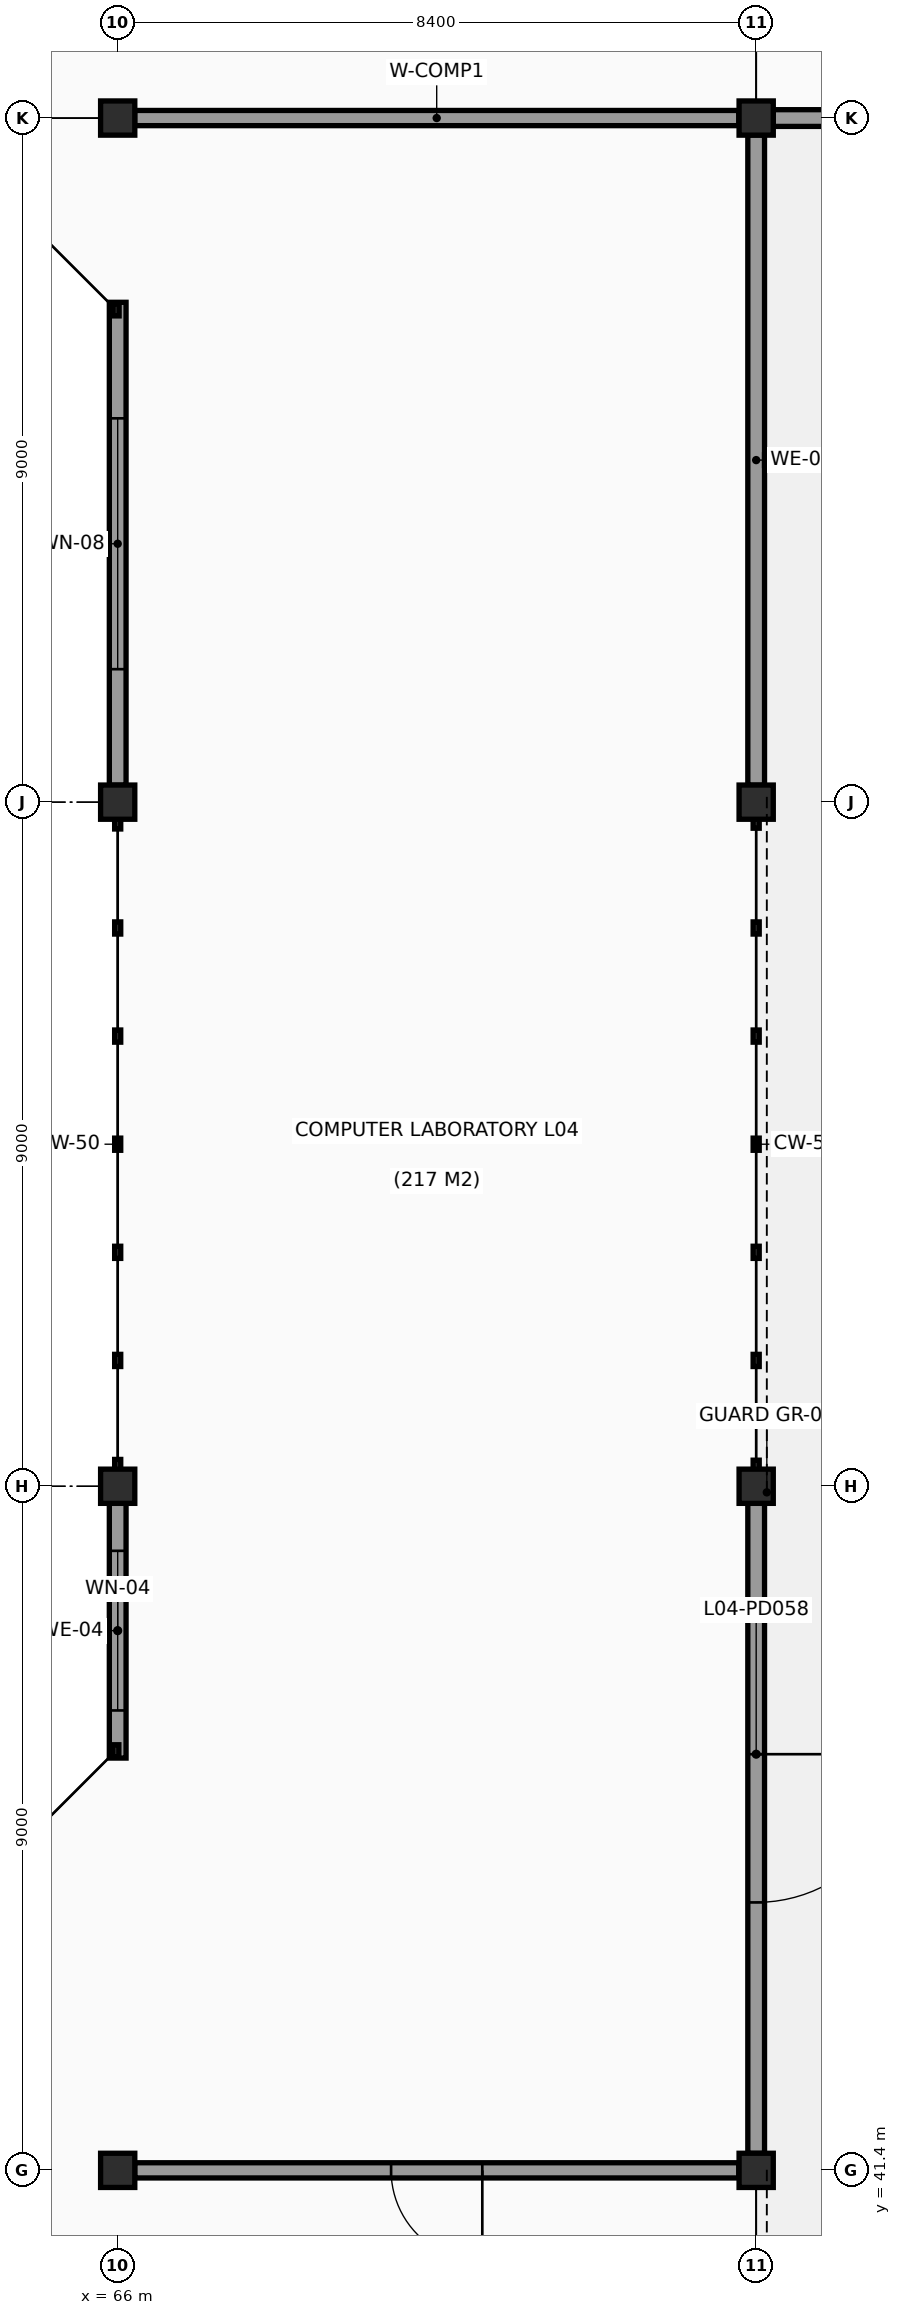
"""IFC4 building model, lengths in metres.
Left out: names, types, materials, properties, quantities, classifications, styles, units other than length and angle.
Written with IfcOpenShell. Run it as: python <this file> out.ifc"""

import sys

from ifc_helpers import new_model, si_unit, direction, frame, frame_2d, origin, origin_2d, place, context, subcontext, project, spatial, rectangle, extrude, element, fill, save


model = new_model("IFC4")
c1 = context("Model", 3, precision=1e-05, world=origin(), true_north=direction((0.0, 1.0)))
c2 = subcontext(c1, "Body", "Model", "MODEL_VIEW")
j1 = project(units=[si_unit("LENGTHUNIT", "METRE"), si_unit("PLANEANGLEUNIT", "RADIAN")], contexts=[c1])
p1 = place(None, origin())
s1 = spatial("IfcSite", under=j1, at=p1, CompositionType="ELEMENT")
p2 = place(p1, origin())
s2 = spatial("IfcBuilding", under=s1, at=p2, CompositionType="ELEMENT")
p3 = place(p2, frame((0.0, 0.0, 15.0)))
s3 = spatial("IfcBuildingStorey", under=s2, at=p3, CompositionType="ELEMENT", Elevation=15.0)
for number, where, z_axis, x_axis in (
    (1, (66.0, 41.4, 0.0), (0.0, 0.0, 1.0), (1.0, 0.0, 0.0)),
    (2, (66.0, 50.4, 0.0), (0.0, 0.0, 1.0), (1.0, 0.0, 0.0)),
    (3, (66.0, 59.4, 0.0), (0.0, 0.0, 1.0), (1.0, 0.0, 0.0)),
    (4, (66.0, 68.4, 0.0), (0.0, 0.0, 1.0), (1.0, 0.0, 0.0)),
    (5, (74.4, 41.4, 0.0), (0.0, 0.0, 1.0), (1.0, 0.0, 0.0)),
    (6, (74.4, 50.4, 0.0), (0.0, 0.0, 1.0), (1.0, 0.0, 0.0)),
    (7, (74.4, 59.4, 0.0), (0.0, 0.0, 1.0), (1.0, 0.0, 0.0)),
    (8, (74.4, 68.4, 0.0), (0.0, 0.0, 1.0), (1.0, 0.0, 0.0)),
):
    element("IfcColumn", number, at=place(p3, frame(where, z_axis=z_axis, x_axis=x_axis)), inside=s3, PredefinedType="COLUMN", context=c2, shape_type="SweptSolid", body=[
        extrude(rectangle(XDim=0.45, YDim=0.45, at=origin_2d()), origin(), (0.0, 0.0, 1.0), 3.6),
    ])
p4 = place(p3, frame((77.177, 68.4, 0.0), z_axis=(0.0, 0.0, 1.0), x_axis=(-1.0, 0.0, 0.0)))
e9 = element("IfcWall", 9, at=p4, inside=s3, PredefinedType="SOLIDWALL", context=c2, shape_type="SweptSolid", body=[
    extrude(rectangle(XDim=2.554, YDim=0.22, at=frame_2d((1.277, 0.0))), origin(), (0.0, 0.0, 1.0), 2.58),
])
p5 = place(p3, frame((74.4, 68.177, 0.0), z_axis=(0.0, 0.0, 1.0), x_axis=(0.0, -1.0, 0.0)))
e10 = element("IfcWall", 10, at=p5, inside=s3, PredefinedType="SOLIDWALL", context=c2, shape_type="SweptSolid", body=[
    extrude(rectangle(XDim=8.554, YDim=0.22, at=frame_2d((4.277, 0.0))), origin(), (0.0, 0.0, 1.0), 2.58),
])
p6 = place(p3, frame((74.4, 50.177, 0.0), z_axis=(0.0, 0.0, 1.0), x_axis=(0.0, -1.0, 0.0)))
e11 = element("IfcWall", 11, at=p6, inside=s3, PredefinedType="SOLIDWALL", context=c2, shape_type="SweptSolid", body=[
    extrude(rectangle(XDim=8.554, YDim=0.22, at=frame_2d((4.277, 0.0))), origin(), (0.0, 0.0, 1.0), 2.65),
])
p7 = place(p6, frame((3.302, 0.0, 0.0)))
e12 = element("IfcOpeningElement", 12, at=p7, cuts=e11, PredefinedType="OPENING", context=c2, shape_type="SweptSolid", body=[
    extrude(rectangle(XDim=1.95, YDim=2.25, at=frame_2d((0.975, 1.125))), frame((0.0, 0.12, 0.0), z_axis=(0.0, -1.0, 0.0), x_axis=(1.0, 0.0, 0.0)), (0.0, 0.0, 1.0), 0.24),
])
p8 = place(p3, frame((66.0, 46.824, 0.0), z_axis=(0.0, 0.0, 1.0), x_axis=(0.0, 1.0, 0.0)))
e13 = element("IfcWall", 13, at=p8, inside=s3, PredefinedType="SOLIDWALL", context=c2, shape_type="SweptSolid", body=[
    extrude(rectangle(XDim=3.353, YDim=0.22, at=frame_2d((1.677, 0.0))), origin(), (0.0, 0.0, 1.0), 2.95),
])
p9 = place(p8, frame((0.626, 0.0, 0.95)))
e14 = element("IfcOpeningElement", 14, at=p9, cuts=e13, PredefinedType="OPENING", context=c2, shape_type="SweptSolid", body=[
    extrude(rectangle(XDim=2.1, YDim=1.2, at=frame_2d((1.05, 0.6))), frame((0.0, 0.12, 0.0), z_axis=(0.0, -1.0, 0.0), x_axis=(1.0, 0.0, 0.0)), (0.0, 0.0, 1.0), 0.24),
])
p10 = place(p3, frame((66.0, 59.623, 0.0), z_axis=(0.0, 0.0, 1.0), x_axis=(0.0, 1.0, 0.0)))
e15 = element("IfcWall", 15, at=p10, inside=s3, PredefinedType="SOLIDWALL", context=c2, shape_type="SweptSolid", body=[
    extrude(rectangle(XDim=6.353, YDim=0.22, at=frame_2d((3.177, 0.0))), origin(), (0.0, 0.0, 1.0), 2.65),
])
p11 = place(p10, frame((1.527, 0.0, 0.95)))
e16 = element("IfcOpeningElement", 16, at=p11, cuts=e15, PredefinedType="OPENING", context=c2, shape_type="SweptSolid", body=[
    extrude(rectangle(XDim=3.3, YDim=1.2, at=frame_2d((1.65, 0.6))), frame((0.0, 0.12, 0.0), z_axis=(0.0, -1.0, 0.0), x_axis=(1.0, 0.0, 0.0)), (0.0, 0.0, 1.0), 0.24),
])
p12 = place(p3, frame((74.171, 41.4, 0.0), z_axis=(0.0, 0.0, 1.0), x_axis=(-1.0, 0.0, 0.0)))
e17 = element("IfcWall", 17, at=p12, inside=s3, PredefinedType="PARTITIONING", context=c2, shape_type="SweptSolid", body=[
    extrude(rectangle(XDim=7.948, YDim=0.2, at=frame_2d((3.974, 0.0))), origin(), (0.0, 0.0, 1.0), 2.7),
])
p13 = place(p12, frame((3.374, 0.0, 0.0)))
e18 = element("IfcOpeningElement", 18, at=p13, cuts=e17, PredefinedType="OPENING", context=c2, shape_type="SweptSolid", body=[
    extrude(rectangle(XDim=1.2, YDim=2.15, at=frame_2d((0.6, 1.075))), frame((0.0, 0.11, 0.0), z_axis=(0.0, -1.0, 0.0), x_axis=(1.0, 0.0, 0.0)), (0.0, 0.0, 1.0), 0.22),
])
p14 = place(p3, frame((66.223, 68.4, 0.0), z_axis=(0.0, 0.0, 1.0), x_axis=(1.0, 0.0, 0.0)))
e19 = element("IfcWall", 19, at=p14, inside=s3, PredefinedType="PARTITIONING", context=c2, shape_type="SweptSolid", body=[
    extrude(rectangle(XDim=7.948, YDim=0.2, at=frame_2d((3.974, 0.0))), origin(), (0.0, 0.0, 1.0), 2.89),
])
p15 = place(p7, origin())
e20 = element("IfcDoor", 20, at=p15, inside=s3, OperationType="SINGLE_SWING_LEFT", PredefinedType="DOOR", context=c2, shape_type="SweptSolid", body=[
    extrude(rectangle(XDim=1.95, YDim=2.25, at=frame_2d((0.975, 1.125))), frame((0.0, 0.025, 0.0), z_axis=(0.0, -1.0, 0.0), x_axis=(1.0, 0.0, 0.0)), (0.0, 0.0, 1.0), 0.05),
])
fill(e12, e20)
p16 = place(p9, origin())
e21 = element("IfcWindow", 21, at=p16, inside=s3, PartitioningType="SINGLE_PANEL", PredefinedType="WINDOW", context=c2, shape_type="SweptSolid", body=[
    extrude(rectangle(XDim=2.1, YDim=1.2, at=frame_2d((1.05, 0.6))), frame((0.0, 0.03, 0.0), z_axis=(0.0, -1.0, 0.0), x_axis=(1.0, 0.0, 0.0)), (0.0, 0.0, 1.0), 0.06),
])
fill(e14, e21)
p17 = place(p11, origin())
e22 = element("IfcWindow", 22, at=p17, inside=s3, PartitioningType="SINGLE_PANEL", PredefinedType="WINDOW", context=c2, shape_type="SweptSolid", body=[
    extrude(rectangle(XDim=3.3, YDim=1.2, at=frame_2d((1.65, 0.6))), frame((0.0, 0.03, 0.0), z_axis=(0.0, -1.0, 0.0), x_axis=(1.0, 0.0, 0.0)), (0.0, 0.0, 1.0), 0.06),
])
fill(e16, e22)
p18 = place(p13, origin())
e23 = element("IfcDoor", 23, at=p18, inside=s3, OperationType="SINGLE_SWING_LEFT", PredefinedType="DOOR", context=c2, shape_type="SweptSolid", body=[
    extrude(rectangle(XDim=1.2, YDim=2.15, at=frame_2d((0.6, 1.075))), frame((0.0, 0.025, 0.0), z_axis=(0.0, -1.0, 0.0), x_axis=(1.0, 0.0, 0.0)), (0.0, 0.0, 1.0), 0.05),
])
fill(e18, e23)
save(model, sys.argv[1])
